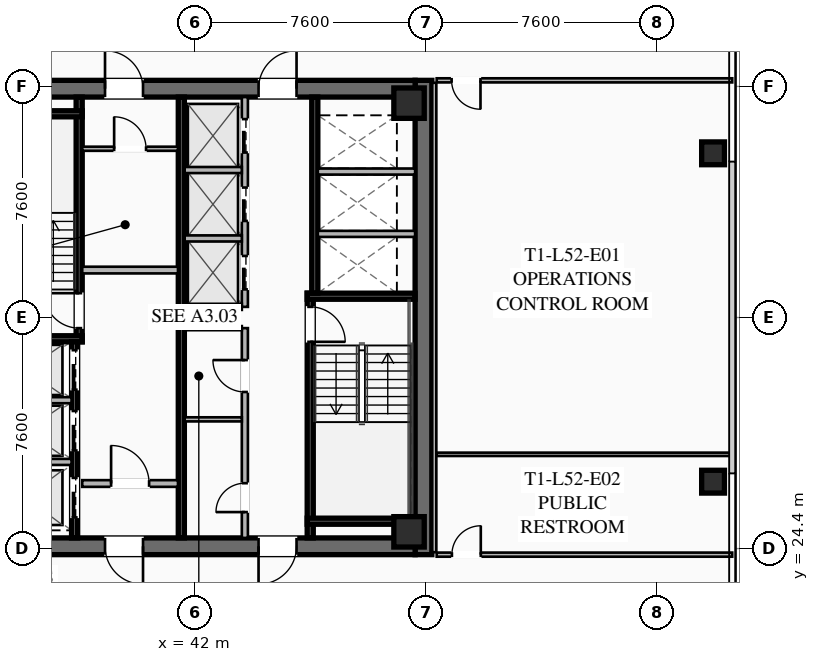
"""IFC4 building model, lengths in metres.
Left out: names, types, materials, properties, quantities, classifications, styles, units other than length and angle.
Written with IfcOpenShell. Run it as: python <this file> out.ifc"""

import sys

from ifc_helpers import new_model, si_unit, direction, frame, frame_2d, origin, origin_2d, place, context, subcontext, project, spatial, rectangle, hollow_rectangle, extrude, element, fill, save


model = new_model("IFC4")
c1 = context("Model", 3, precision=1e-05, world=origin(), true_north=direction((0.0, 1.0)))
c2 = subcontext(c1, "Body", "Model", "MODEL_VIEW")
j1 = project(units=[si_unit("LENGTHUNIT", "METRE"), si_unit("PLANEANGLEUNIT", "RADIAN")], contexts=[c1])
p1 = place(None, origin())
s1 = spatial("IfcSite", under=j1, at=p1, CompositionType="ELEMENT")
p2 = place(p1, origin())
s2 = spatial("IfcBuilding", under=s1, at=p2, CompositionType="ELEMENT")
p3 = place(p2, frame((0.0, 0.0, 192.5)))
s3 = spatial("IfcBuildingStorey", under=s2, at=p3, CompositionType="ELEMENT", Elevation=192.5)
p4 = place(p3, frame((49.525, 39.8, 0.0), z_axis=(0.0, 0.0, 1.0), x_axis=(0.0, -1.0, 0.0)))
e1 = element("IfcWall", 1, at=p4, inside=s3, PredefinedType="SHEAR", context=c2, shape_type="SweptSolid", body=[
    extrude(rectangle(XDim=15.6, YDim=0.55, at=frame_2d((7.8, 0.0))), origin(), (0.0, 0.0, 1.0), 3.55),
])
p5 = place(p3, frame((49.25, 24.475, 0.0), z_axis=(0.0, 0.0, 1.0), x_axis=(-1.0, 0.0, 0.0)))
e2 = element("IfcWall", 2, at=p5, inside=s3, PredefinedType="SHEAR", context=c2, shape_type="SweptSolid", body=[
    extrude(rectangle(XDim=14.5, YDim=0.55, at=frame_2d((7.25, 0.0))), origin(), (0.0, 0.0, 1.0), 3.55),
])
p6 = place(p5, frame((8.95, 0.0, 0.0)))
e3 = element("IfcOpeningElement", 3, at=p6, cuts=e2, PredefinedType="OPENING", context=c2, shape_type="SweptSolid", body=[
    extrude(rectangle(XDim=1.25, YDim=2.25, at=frame_2d((0.625, 1.125))), frame((0.0, 0.285, 0.0), z_axis=(0.0, -1.0, 0.0), x_axis=(1.0, 0.0, 0.0)), (0.0, 0.0, 1.0), 0.57),
])
p7 = place(p5, frame((3.9, 0.0, 0.0)))
e4 = element("IfcOpeningElement", 4, at=p7, cuts=e2, PredefinedType="OPENING", context=c2, shape_type="SweptSolid", body=[
    extrude(rectangle(XDim=1.25, YDim=2.25, at=frame_2d((0.625, 1.125))), frame((0.0, 0.285, 0.0), z_axis=(0.0, -1.0, 0.0), x_axis=(1.0, 0.0, 0.0)), (0.0, 0.0, 1.0), 0.57),
])
p8 = place(p3, frame((34.75, 39.525, 0.0), z_axis=(0.0, 0.0, 1.0), x_axis=(1.0, 0.0, 0.0)))
e5 = element("IfcWall", 5, at=p8, inside=s3, PredefinedType="SHEAR", context=c2, shape_type="SweptSolid", body=[
    extrude(rectangle(XDim=14.5, YDim=0.55, at=frame_2d((7.25, 0.0))), origin(), (0.0, 0.0, 1.0), 3.55),
])
p9 = place(p8, frame((4.3, 0.0, 0.0)))
e6 = element("IfcOpeningElement", 6, at=p9, cuts=e5, PredefinedType="OPENING", context=c2, shape_type="SweptSolid", body=[
    extrude(rectangle(XDim=1.25, YDim=2.25, at=frame_2d((0.625, 1.125))), frame((0.0, 0.285, 0.0), z_axis=(0.0, -1.0, 0.0), x_axis=(1.0, 0.0, 0.0)), (0.0, 0.0, 1.0), 0.57),
])
p10 = place(p8, frame((9.35, 0.0, 0.0)))
e7 = element("IfcOpeningElement", 7, at=p10, cuts=e5, PredefinedType="OPENING", context=c2, shape_type="SweptSolid", body=[
    extrude(rectangle(XDim=1.25, YDim=2.25, at=frame_2d((0.625, 1.125))), frame((0.0, 0.285, 0.0), z_axis=(0.0, -1.0, 0.0), x_axis=(1.0, 0.0, 0.0)), (0.0, 0.0, 1.0), 0.57),
])
for number, where, z_axis, x_axis in (
    (8, (49.05, 24.95, 0.0), (0.0, 0.0, 1.0), (1.0, 0.0, 0.0)),
    (9, (49.05, 39.05, 0.0), (0.0, 0.0, 1.0), (1.0, 0.0, 0.0)),
):
    element("IfcColumn", number, at=place(p3, frame(where, z_axis=z_axis, x_axis=x_axis)), inside=s3, PredefinedType="COLUMN", context=c2, shape_type="SweptSolid", body=[
        extrude(hollow_rectangle(XDim=1.0, YDim=1.0, WallThickness=0.04, at=origin_2d()), origin(), (0.0, 0.0, 1.0), 3.37),
    ])
for number, where, z_axis, x_axis in (
    (10, (59.05, 26.6, 0.0), (0.0, 0.0, 1.0), (1.0, 0.0, 0.0)),
    (11, (59.05, 37.4, 0.0), (0.0, 0.0, 1.0), (1.0, 0.0, 0.0)),
):
    element("IfcColumn", number, at=place(p3, frame(where, z_axis=z_axis, x_axis=x_axis)), inside=s3, PredefinedType="COLUMN", context=c2, shape_type="SweptSolid", body=[
        extrude(hollow_rectangle(XDim=0.75, YDim=0.75, WallThickness=0.032, at=origin_2d()), origin(), (0.0, 0.0, 1.0), 3.37),
    ])
p11 = place(p3, frame((38.2, 31.2, 0.0), z_axis=(0.0, 0.0, 1.0), x_axis=(0.0, 1.0, 0.0)))
e12 = element("IfcWall", 12, at=p11, inside=s3, PredefinedType="SHEAR", context=c2, shape_type="SweptSolid", body=[
    extrude(rectangle(XDim=8.05, YDim=0.2, at=frame_2d((4.025, 0.0))), origin(), (0.0, 0.0, 1.0), 3.37),
])
p12 = place(p11, frame((0.45, 0.0, 0.0)))
e13 = element("IfcOpeningElement", 13, at=p12, cuts=e12, PredefinedType="OPENING", context=c2, shape_type="SweptSolid", body=[
    extrude(rectangle(XDim=1.15, YDim=2.2, at=frame_2d((0.575, 1.1))), frame((0.0, 0.11, 0.0), z_axis=(0.0, -1.0, 0.0), x_axis=(1.0, 0.0, 0.0)), (0.0, 0.0, 1.0), 0.22),
])
for number, where, z_axis, x_axis in (
    (14, (34.75, 31.3, 0.0), (0.0, 0.0, 1.0), (1.0, 0.0, 0.0)),
    (15, (34.75, 38.7, 0.0), (0.0, 0.0, 1.0), (1.0, 0.0, 0.0)),
):
    element("IfcWall", number, at=place(p3, frame(where, z_axis=z_axis, x_axis=x_axis)), inside=s3, PredefinedType="SHEAR", context=c2, shape_type="SweptSolid", body=[
        extrude(rectangle(XDim=3.55, YDim=0.2, at=frame_2d((1.775, 0.0))), origin(), (0.0, 0.0, 1.0), 3.37),
    ])
p13 = place(p3, frame((45.8, 32.8, 0.0), z_axis=(0.0, 0.0, 1.0), x_axis=(0.0, -1.0, 0.0)))
e16 = element("IfcWall", 16, at=p13, inside=s3, PredefinedType="SHEAR", context=c2, shape_type="SweptSolid", body=[
    extrude(rectangle(XDim=8.05, YDim=0.2, at=frame_2d((4.025, 0.0))), origin(), (0.0, 0.0, 1.0), 3.37),
])
p14 = place(p13, frame((0.45, 0.0, 0.0)))
e17 = element("IfcOpeningElement", 17, at=p14, cuts=e16, PredefinedType="OPENING", context=c2, shape_type="SweptSolid", body=[
    extrude(rectangle(XDim=1.15, YDim=2.2, at=frame_2d((0.575, 1.1))), frame((0.0, 0.11, 0.0), z_axis=(0.0, -1.0, 0.0), x_axis=(1.0, 0.0, 0.0)), (0.0, 0.0, 1.0), 0.22),
])
for number, where, z_axis, x_axis in (
    (18, (45.7, 32.7, 0.0), (0.0, 0.0, 1.0), (1.0, 0.0, 0.0)),
    (19, (45.7, 25.3, 0.0), (0.0, 0.0, 1.0), (1.0, 0.0, 0.0)),
):
    element("IfcWall", number, at=place(p3, frame(where, z_axis=z_axis, x_axis=x_axis)), inside=s3, PredefinedType="SHEAR", context=c2, shape_type="SweptSolid", body=[
        extrude(rectangle(XDim=3.55, YDim=0.2, at=frame_2d((1.775, 0.0))), origin(), (0.0, 0.0, 1.0), 3.37),
    ])
p15 = place(p3, frame((41.56, 24.75, 0.0), z_axis=(0.0, 0.0, 1.0), x_axis=(0.0, 1.0, 0.0)))
e20 = element("IfcWall", 20, at=p15, inside=s3, PredefinedType="SHEAR", context=c2, shape_type="SweptSolid", body=[
    extrude(rectangle(XDim=14.5, YDim=0.2, at=frame_2d((7.25, 0.0))), origin(), (0.0, 0.0, 1.0), 3.37),
])
p16 = place(p3, frame((38.3, 33.56, 0.0), z_axis=(0.0, 0.0, 1.0), x_axis=(1.0, 0.0, 0.0)))
e21 = element("IfcWall", 21, at=p16, inside=s3, PredefinedType="SOLIDWALL", context=c2, shape_type="SweptSolid", body=[
    extrude(rectangle(XDim=3.15, YDim=0.22, at=frame_2d((1.575, 0.0))), origin(), (0.0, 0.0, 1.0), 2.723),
])
p17 = place(p3, frame((38.3, 26.54, 0.0), z_axis=(0.0, 0.0, 1.0), x_axis=(1.0, 0.0, 0.0)))
e22 = element("IfcWall", 22, at=p17, inside=s3, PredefinedType="SOLIDWALL", context=c2, shape_type="SweptSolid", body=[
    extrude(rectangle(XDim=3.15, YDim=0.22, at=frame_2d((1.575, 0.0))), origin(), (0.0, 0.0, 1.0), 2.723),
])
p18 = place(p17, frame((0.95, 0.0, 0.0)))
e23 = element("IfcOpeningElement", 23, at=p18, cuts=e22, PredefinedType="OPENING", context=c2, shape_type="SweptSolid", body=[
    extrude(rectangle(XDim=1.25, YDim=2.25, at=frame_2d((0.625, 1.125))), frame((0.0, 0.12, 0.0), z_axis=(0.0, -1.0, 0.0), x_axis=(1.0, 0.0, 0.0)), (0.0, 0.0, 1.0), 0.24),
])
p19 = place(p3, frame((38.05, 24.75, 0.0), z_axis=(0.0, 0.0, 1.0), x_axis=(0.0, 1.0, 0.0)))
e24 = element("IfcWall", 24, at=p19, inside=s3, PredefinedType="SHEAR", context=c2, shape_type="SweptSolid", body=[
    extrude(rectangle(XDim=6.45, YDim=0.2, at=frame_2d((3.225, 0.0))), origin(), (0.0, 0.0, 1.0), 3.37),
])
p20 = place(p19, frame((4.875, 0.0, 0.0)))
e25 = element("IfcOpeningElement", 25, at=p20, cuts=e24, PredefinedType="OPENING", context=c2, shape_type="SweptSolid", body=[
    extrude(rectangle(XDim=1.3, YDim=2.25, at=frame_2d((0.65, 1.125))), frame((0.0, 0.11, 0.0), z_axis=(0.0, -1.0, 0.0), x_axis=(1.0, 0.0, 0.0)), (0.0, 0.0, 1.0), 0.22),
])
p21 = place(p19, frame((2.875, 0.0, 0.0)))
e26 = element("IfcOpeningElement", 26, at=p21, cuts=e24, PredefinedType="OPENING", context=c2, shape_type="SweptSolid", body=[
    extrude(rectangle(XDim=1.3, YDim=2.25, at=frame_2d((0.65, 1.125))), frame((0.0, 0.11, 0.0), z_axis=(0.0, -1.0, 0.0), x_axis=(1.0, 0.0, 0.0)), (0.0, 0.0, 1.0), 0.22),
])
p22 = place(p19, frame((0.675, 0.0, 0.0)))
e27 = element("IfcOpeningElement", 27, at=p22, cuts=e24, PredefinedType="OPENING", context=c2, shape_type="SweptSolid", body=[
    extrude(rectangle(XDim=1.3, YDim=2.25, at=frame_2d((0.65, 1.125))), frame((0.0, 0.11, 0.0), z_axis=(0.0, -1.0, 0.0), x_axis=(1.0, 0.0, 0.0)), (0.0, 0.0, 1.0), 0.22),
])
for number, where, z_axis, x_axis in (
    (28, (34.75, 27.25, 0.0), (0.0, 0.0, 1.0), (1.0, 0.0, 0.0)),
    (29, (34.75, 29.28, 0.0), (0.0, 0.0, 1.0), (1.0, 0.0, 0.0)),
):
    element("IfcWall", number, at=place(p3, frame(where, z_axis=z_axis, x_axis=x_axis)), inside=s3, PredefinedType="SOLIDWALL", context=c2, shape_type="SweptSolid", body=[
        extrude(rectangle(XDim=3.2, YDim=0.2, at=frame_2d((1.6, 0.0))), origin(), (0.0, 0.0, 1.0), 3.37),
    ])
p23 = place(p3, frame((45.95, 39.25, 0.0), z_axis=(0.0, 0.0, 1.0), x_axis=(0.0, -1.0, 0.0)))
e30 = element("IfcWall", 30, at=p23, inside=s3, PredefinedType="SHEAR", context=c2, shape_type="SweptSolid", body=[
    extrude(rectangle(XDim=6.45, YDim=0.2, at=frame_2d((3.225, 0.0))), origin(), (0.0, 0.0, 1.0), 3.37),
])
for number, where, z_axis, x_axis in (
    (31, (46.05, 34.75, 0.0), (0.0, 0.0, 1.0), (1.0, 0.0, 0.0)),
    (32, (46.05, 36.8, 0.0), (0.0, 0.0, 1.0), (1.0, 0.0, 0.0)),
):
    element("IfcWall", number, at=place(p3, frame(where, z_axis=z_axis, x_axis=x_axis)), inside=s3, PredefinedType="SOLIDWALL", context=c2, shape_type="SweptSolid", body=[
        extrude(rectangle(XDim=3.2, YDim=0.2, at=frame_2d((1.6, 0.0))), origin(), (0.0, 0.0, 1.0), 3.37),
    ])
p24 = place(p3, frame((38.3, 37.55, 0.0), z_axis=(0.0, 0.0, 1.0), x_axis=(1.0, 0.0, 0.0)))
e33 = element("IfcWall", 33, at=p24, inside=s3, PredefinedType="PARTITIONING", context=c2, shape_type="SweptSolid", body=[
    extrude(rectangle(XDim=3.15, YDim=0.135, at=frame_2d((1.575, 0.0))), origin(), (0.0, 0.0, 1.0), 2.723),
])
p25 = place(p24, frame((1.05, 0.0, 0.0)))
e34 = element("IfcOpeningElement", 34, at=p25, cuts=e33, PredefinedType="OPENING", context=c2, shape_type="SweptSolid", body=[
    extrude(rectangle(XDim=1.05, YDim=2.2, at=frame_2d((0.525, 1.1))), frame((0.0, 0.077, 0.0), z_axis=(0.0, -1.0, 0.0), x_axis=(1.0, 0.0, 0.0)), (0.0, 0.0, 1.0), 0.155),
])
p26 = place(p3, frame((43.65, 24.75, 0.0), z_axis=(0.0, 0.0, 1.0), x_axis=(0.0, 1.0, 0.0)))
e35 = element("IfcWall", 35, at=p26, inside=s3, PredefinedType="SOLIDWALL", context=c2, shape_type="SweptSolid", body=[
    extrude(rectangle(XDim=6.9, YDim=0.2, at=frame_2d((3.45, 0.0))), origin(), (0.0, 0.0, 1.0), 2.723),
])
p27 = place(p26, frame((0.85, 0.0, 0.0)))
e36 = element("IfcOpeningElement", 36, at=p27, cuts=e35, PredefinedType="OPENING", context=c2, shape_type="SweptSolid", body=[
    extrude(rectangle(XDim=0.95, YDim=2.05, at=frame_2d((0.475, 1.025))), frame((0.0, 0.11, 0.0), z_axis=(0.0, -1.0, 0.0), x_axis=(1.0, 0.0, 0.0)), (0.0, 0.0, 1.0), 0.22),
])
p28 = place(p26, frame((4.8, 0.0, 0.0)))
e37 = element("IfcOpeningElement", 37, at=p28, cuts=e35, PredefinedType="OPENING", context=c2, shape_type="SweptSolid", body=[
    extrude(rectangle(XDim=1.05, YDim=2.2, at=frame_2d((0.525, 1.1))), frame((0.0, 0.11, 0.0), z_axis=(0.0, -1.0, 0.0), x_axis=(1.0, 0.0, 0.0)), (0.0, 0.0, 1.0), 0.22),
])
for number, where, z_axis, x_axis in (
    (38, (41.67, 31.65, 0.0), (0.0, 0.0, 1.0), (1.0, 0.0, 0.0)),
    (39, (41.67, 28.65, 0.0), (0.0, 0.0, 1.0), (1.0, 0.0, 0.0)),
):
    element("IfcWall", number, at=place(p3, frame(where, z_axis=z_axis, x_axis=x_axis)), inside=s3, PredefinedType="PARTITIONING", context=c2, shape_type="SweptSolid", body=[
        extrude(rectangle(XDim=1.88, YDim=0.135, at=frame_2d((0.94, 0.0))), origin(), (0.0, 0.0, 1.0), 2.723),
    ])
p29 = place(p3, frame((43.65, 32.35, 0.0), z_axis=(0.0, 0.0, 1.0), x_axis=(0.0, 1.0, 0.0)))
e40 = element("IfcWall", 40, at=p29, inside=s3, PredefinedType="SOLIDWALL", context=c2, shape_type="SweptSolid", body=[
    extrude(rectangle(XDim=6.9, YDim=0.2, at=frame_2d((3.45, 0.0))), origin(), (0.0, 0.0, 1.0), 3.37),
])
p30 = place(p29, frame((0.575, 0.0, 0.0)))
e41 = element("IfcOpeningElement", 41, at=p30, cuts=e40, PredefinedType="OPENING", context=c2, shape_type="SweptSolid", body=[
    extrude(rectangle(XDim=1.1, YDim=2.2, at=frame_2d((0.55, 1.1))), frame((0.0, 0.11, 0.0), z_axis=(0.0, -1.0, 0.0), x_axis=(1.0, 0.0, 0.0)), (0.0, 0.0, 1.0), 0.22),
])
p31 = place(p29, frame((2.825, 0.0, 0.0)))
e42 = element("IfcOpeningElement", 42, at=p31, cuts=e40, PredefinedType="OPENING", context=c2, shape_type="SweptSolid", body=[
    extrude(rectangle(XDim=1.1, YDim=2.2, at=frame_2d((0.55, 1.1))), frame((0.0, 0.11, 0.0), z_axis=(0.0, -1.0, 0.0), x_axis=(1.0, 0.0, 0.0)), (0.0, 0.0, 1.0), 0.22),
])
p32 = place(p29, frame((5.075, 0.0, 0.0)))
e43 = element("IfcOpeningElement", 43, at=p32, cuts=e40, PredefinedType="OPENING", context=c2, shape_type="SweptSolid", body=[
    extrude(rectangle(XDim=1.1, YDim=2.2, at=frame_2d((0.55, 1.1))), frame((0.0, 0.11, 0.0), z_axis=(0.0, -1.0, 0.0), x_axis=(1.0, 0.0, 0.0)), (0.0, 0.0, 1.0), 0.22),
])
for number, where, z_axis, x_axis in (
    (44, (41.67, 32.35, 0.0), (0.0, 0.0, 1.0), (1.0, 0.0, 0.0)),
    (45, (41.67, 34.6, 0.0), (0.0, 0.0, 1.0), (1.0, 0.0, 0.0)),
    (46, (41.67, 36.85, 0.0), (0.0, 0.0, 1.0), (1.0, 0.0, 0.0)),
):
    element("IfcWall", number, at=place(p3, frame(where, z_axis=z_axis, x_axis=x_axis)), inside=s3, PredefinedType="SOLIDWALL", context=c2, shape_type="SweptSolid", body=[
        extrude(rectangle(XDim=1.88, YDim=0.2, at=frame_2d((0.94, 0.0))), origin(), (0.0, 0.0, 1.0), 3.37),
    ])
p33 = place(p3, frame((49.88, 39.72, 0.0), z_axis=(0.0, 0.0, 1.0), x_axis=(0.0, -1.0, 0.0)))
e47 = element("IfcWall", 47, at=p33, inside=s3, PredefinedType="PARTITIONING", context=c2, shape_type="SweptSolid", body=[
    extrude(rectangle(XDim=15.44, YDim=0.135, at=frame_2d((7.72, 0.0))), origin(), (0.0, 0.0, 1.0), 2.723),
])
p34 = place(p3, frame((59.68, 39.8, 0.0), z_axis=(0.0, 0.0, 1.0), x_axis=(-1.0, 0.0, 0.0)))
e48 = element("IfcWall", 48, at=p34, inside=s3, PredefinedType="PARTITIONING", context=c2, shape_type="SweptSolid", body=[
    extrude(rectangle(XDim=9.72, YDim=0.135, at=frame_2d((4.86, 0.0))), origin(), (0.0, 0.0, 1.0), 2.723),
])
p35 = place(p34, frame((8.28, 0.0, 0.0)))
e49 = element("IfcOpeningElement", 49, at=p35, cuts=e48, PredefinedType="OPENING", context=c2, shape_type="SweptSolid", body=[
    extrude(rectangle(XDim=0.95, YDim=2.05, at=frame_2d((0.475, 1.025))), frame((0.0, 0.077, 0.0), z_axis=(0.0, -1.0, 0.0), x_axis=(1.0, 0.0, 0.0)), (0.0, 0.0, 1.0), 0.155),
])
p36 = place(p3, frame((49.96, 24.2, 0.0), z_axis=(0.0, 0.0, 1.0), x_axis=(1.0, 0.0, 0.0)))
e50 = element("IfcWall", 50, at=p36, inside=s3, PredefinedType="PARTITIONING", context=c2, shape_type="SweptSolid", body=[
    extrude(rectangle(XDim=9.72, YDim=0.135, at=frame_2d((4.86, 0.0))), origin(), (0.0, 0.0, 1.0), 2.723),
])
p37 = place(p36, frame((0.5, 0.0, 0.0)))
e51 = element("IfcOpeningElement", 51, at=p37, cuts=e50, PredefinedType="OPENING", context=c2, shape_type="SweptSolid", body=[
    extrude(rectangle(XDim=0.95, YDim=2.05, at=frame_2d((0.475, 1.025))), frame((0.0, 0.077, 0.0), z_axis=(0.0, -1.0, 0.0), x_axis=(1.0, 0.0, 0.0)), (0.0, 0.0, 1.0), 0.155),
])
p38 = place(p3, frame((49.96, 27.5, 0.0), z_axis=(0.0, 0.0, 1.0), x_axis=(1.0, 0.0, 0.0)))
e52 = element("IfcWall", 52, at=p38, inside=s3, PredefinedType="PARTITIONING", context=c2, shape_type="SweptSolid", body=[
    extrude(rectangle(XDim=9.72, YDim=0.11, at=frame_2d((4.86, 0.0))), origin(), (0.0, 0.0, 1.0), 2.723),
])
p39 = place(p9, origin())
e53 = element("IfcDoor", 53, at=p39, inside=s3, OperationType="SINGLE_SWING_LEFT", PredefinedType="DOOR", context=c2, shape_type="SweptSolid", body=[
    extrude(rectangle(XDim=1.25, YDim=2.25, at=frame_2d((0.625, 1.125))), frame((0.0, 0.025, 0.0), z_axis=(0.0, -1.0, 0.0), x_axis=(1.0, 0.0, 0.0)), (0.0, 0.0, 1.0), 0.05),
])
fill(e6, e53)
p40 = place(p10, origin())
e54 = element("IfcDoor", 54, at=p40, inside=s3, OperationType="SINGLE_SWING_RIGHT", PredefinedType="DOOR", context=c2, shape_type="SweptSolid", body=[
    extrude(rectangle(XDim=1.25, YDim=2.25, at=frame_2d((0.625, 1.125))), frame((0.0, 0.025, 0.0), z_axis=(0.0, -1.0, 0.0), x_axis=(1.0, 0.0, 0.0)), (0.0, 0.0, 1.0), 0.05),
])
fill(e7, e54)
p41 = place(p6, origin())
e55 = element("IfcDoor", 55, at=p41, inside=s3, OperationType="SINGLE_SWING_LEFT", PredefinedType="DOOR", context=c2, shape_type="SweptSolid", body=[
    extrude(rectangle(XDim=1.25, YDim=2.25, at=frame_2d((0.625, 1.125))), frame((0.0, 0.025, 0.0), z_axis=(0.0, -1.0, 0.0), x_axis=(1.0, 0.0, 0.0)), (0.0, 0.0, 1.0), 0.05),
])
fill(e3, e55)
p42 = place(p7, origin())
e56 = element("IfcDoor", 56, at=p42, inside=s3, OperationType="SINGLE_SWING_RIGHT", PredefinedType="DOOR", context=c2, shape_type="SweptSolid", body=[
    extrude(rectangle(XDim=1.25, YDim=2.25, at=frame_2d((0.625, 1.125))), frame((0.0, 0.025, 0.0), z_axis=(0.0, -1.0, 0.0), x_axis=(1.0, 0.0, 0.0)), (0.0, 0.0, 1.0), 0.05),
])
fill(e4, e56)
p43 = place(p12, origin())
e57 = element("IfcDoor", 57, at=p43, inside=s3, OperationType="SINGLE_SWING_RIGHT", PredefinedType="DOOR", context=c2, shape_type="SweptSolid", body=[
    extrude(rectangle(XDim=1.15, YDim=2.2, at=frame_2d((0.575, 1.1))), frame((0.0, 0.025, 0.0), z_axis=(0.0, -1.0, 0.0), x_axis=(1.0, 0.0, 0.0)), (0.0, 0.0, 1.0), 0.05),
])
fill(e13, e57)
p44 = place(p14, origin())
e58 = element("IfcDoor", 58, at=p44, inside=s3, OperationType="SINGLE_SWING_RIGHT", PredefinedType="DOOR", context=c2, shape_type="SweptSolid", body=[
    extrude(rectangle(XDim=1.15, YDim=2.2, at=frame_2d((0.575, 1.1))), frame((0.0, 0.025, 0.0), z_axis=(0.0, -1.0, 0.0), x_axis=(1.0, 0.0, 0.0)), (0.0, 0.0, 1.0), 0.05),
])
fill(e17, e58)
p45 = place(p18, origin())
e59 = element("IfcDoor", 59, at=p45, inside=s3, OperationType="SINGLE_SWING_LEFT", PredefinedType="DOOR", context=c2, shape_type="SweptSolid", body=[
    extrude(rectangle(XDim=1.25, YDim=2.25, at=frame_2d((0.625, 1.125))), frame((0.0, 0.025, 0.0), z_axis=(0.0, -1.0, 0.0), x_axis=(1.0, 0.0, 0.0)), (0.0, 0.0, 1.0), 0.05),
])
fill(e23, e59)
p46 = place(p25, origin())
e60 = element("IfcDoor", 60, at=p46, inside=s3, OperationType="SINGLE_SWING_LEFT", PredefinedType="DOOR", context=c2, shape_type="SweptSolid", body=[
    extrude(rectangle(XDim=1.05, YDim=2.2, at=frame_2d((0.525, 1.1))), frame((0.0, 0.025, 0.0), z_axis=(0.0, -1.0, 0.0), x_axis=(1.0, 0.0, 0.0)), (0.0, 0.0, 1.0), 0.05),
])
fill(e34, e60)
p47 = place(p27, origin())
e61 = element("IfcDoor", 61, at=p47, inside=s3, OperationType="SINGLE_SWING_LEFT", PredefinedType="DOOR", context=c2, shape_type="SweptSolid", body=[
    extrude(rectangle(XDim=0.95, YDim=2.05, at=frame_2d((0.475, 1.025))), frame((0.0, 0.025, 0.0), z_axis=(0.0, -1.0, 0.0), x_axis=(1.0, 0.0, 0.0)), (0.0, 0.0, 1.0), 0.05),
])
fill(e36, e61)
p48 = place(p28, origin())
e62 = element("IfcDoor", 62, at=p48, inside=s3, OperationType="SINGLE_SWING_RIGHT", PredefinedType="DOOR", context=c2, shape_type="SweptSolid", body=[
    extrude(rectangle(XDim=1.05, YDim=2.2, at=frame_2d((0.525, 1.1))), frame((0.0, 0.025, 0.0), z_axis=(0.0, -1.0, 0.0), x_axis=(1.0, 0.0, 0.0)), (0.0, 0.0, 1.0), 0.05),
])
fill(e37, e62)
p49 = place(p35, origin())
e63 = element("IfcDoor", 63, at=p49, inside=s3, OperationType="SINGLE_SWING_LEFT", PredefinedType="DOOR", context=c2, shape_type="SweptSolid", body=[
    extrude(rectangle(XDim=0.95, YDim=2.05, at=frame_2d((0.475, 1.025))), frame((0.0, 0.025, 0.0), z_axis=(0.0, -1.0, 0.0), x_axis=(1.0, 0.0, 0.0)), (0.0, 0.0, 1.0), 0.05),
])
fill(e49, e63)
p50 = place(p37, origin())
e64 = element("IfcDoor", 64, at=p50, inside=s3, OperationType="SINGLE_SWING_RIGHT", PredefinedType="DOOR", context=c2, shape_type="SweptSolid", body=[
    extrude(rectangle(XDim=0.95, YDim=2.05, at=frame_2d((0.475, 1.025))), frame((0.0, 0.025, 0.0), z_axis=(0.0, -1.0, 0.0), x_axis=(1.0, 0.0, 0.0)), (0.0, 0.0, 1.0), 0.05),
])
fill(e51, e64)
p51 = place(p20, origin())
e65 = element("IfcDoor", 65, at=p51, inside=s3, OperationType="SLIDING_TO_LEFT", PredefinedType="DOOR", context=c2, shape_type="SweptSolid", body=[
    extrude(rectangle(XDim=1.3, YDim=2.25, at=frame_2d((0.65, 1.125))), frame((0.0, 0.025, 0.0), z_axis=(0.0, -1.0, 0.0), x_axis=(1.0, 0.0, 0.0)), (0.0, 0.0, 1.0), 0.05),
])
fill(e25, e65)
p52 = place(p21, origin())
e66 = element("IfcDoor", 66, at=p52, inside=s3, OperationType="SLIDING_TO_LEFT", PredefinedType="DOOR", context=c2, shape_type="SweptSolid", body=[
    extrude(rectangle(XDim=1.3, YDim=2.25, at=frame_2d((0.65, 1.125))), frame((0.0, 0.025, 0.0), z_axis=(0.0, -1.0, 0.0), x_axis=(1.0, 0.0, 0.0)), (0.0, 0.0, 1.0), 0.05),
])
fill(e26, e66)
p53 = place(p22, origin())
e67 = element("IfcDoor", 67, at=p53, inside=s3, OperationType="SLIDING_TO_LEFT", PredefinedType="DOOR", context=c2, shape_type="SweptSolid", body=[
    extrude(rectangle(XDim=1.3, YDim=2.25, at=frame_2d((0.65, 1.125))), frame((0.0, 0.025, 0.0), z_axis=(0.0, -1.0, 0.0), x_axis=(1.0, 0.0, 0.0)), (0.0, 0.0, 1.0), 0.05),
])
fill(e27, e67)
p54 = place(p30, origin())
e68 = element("IfcDoor", 68, at=p54, inside=s3, OperationType="SLIDING_TO_LEFT", PredefinedType="DOOR", context=c2, shape_type="SweptSolid", body=[
    extrude(rectangle(XDim=1.1, YDim=2.2, at=frame_2d((0.55, 1.1))), frame((0.0, 0.025, 0.0), z_axis=(0.0, -1.0, 0.0), x_axis=(1.0, 0.0, 0.0)), (0.0, 0.0, 1.0), 0.05),
])
fill(e41, e68)
p55 = place(p31, origin())
e69 = element("IfcDoor", 69, at=p55, inside=s3, OperationType="SLIDING_TO_LEFT", PredefinedType="DOOR", context=c2, shape_type="SweptSolid", body=[
    extrude(rectangle(XDim=1.1, YDim=2.2, at=frame_2d((0.55, 1.1))), frame((0.0, 0.025, 0.0), z_axis=(0.0, -1.0, 0.0), x_axis=(1.0, 0.0, 0.0)), (0.0, 0.0, 1.0), 0.05),
])
fill(e42, e69)
p56 = place(p32, origin())
e70 = element("IfcDoor", 70, at=p56, inside=s3, OperationType="SLIDING_TO_LEFT", PredefinedType="DOOR", context=c2, shape_type="SweptSolid", body=[
    extrude(rectangle(XDim=1.1, YDim=2.2, at=frame_2d((0.55, 1.1))), frame((0.0, 0.025, 0.0), z_axis=(0.0, -1.0, 0.0), x_axis=(1.0, 0.0, 0.0)), (0.0, 0.0, 1.0), 0.05),
])
fill(e43, e70)
save(model, sys.argv[1])
